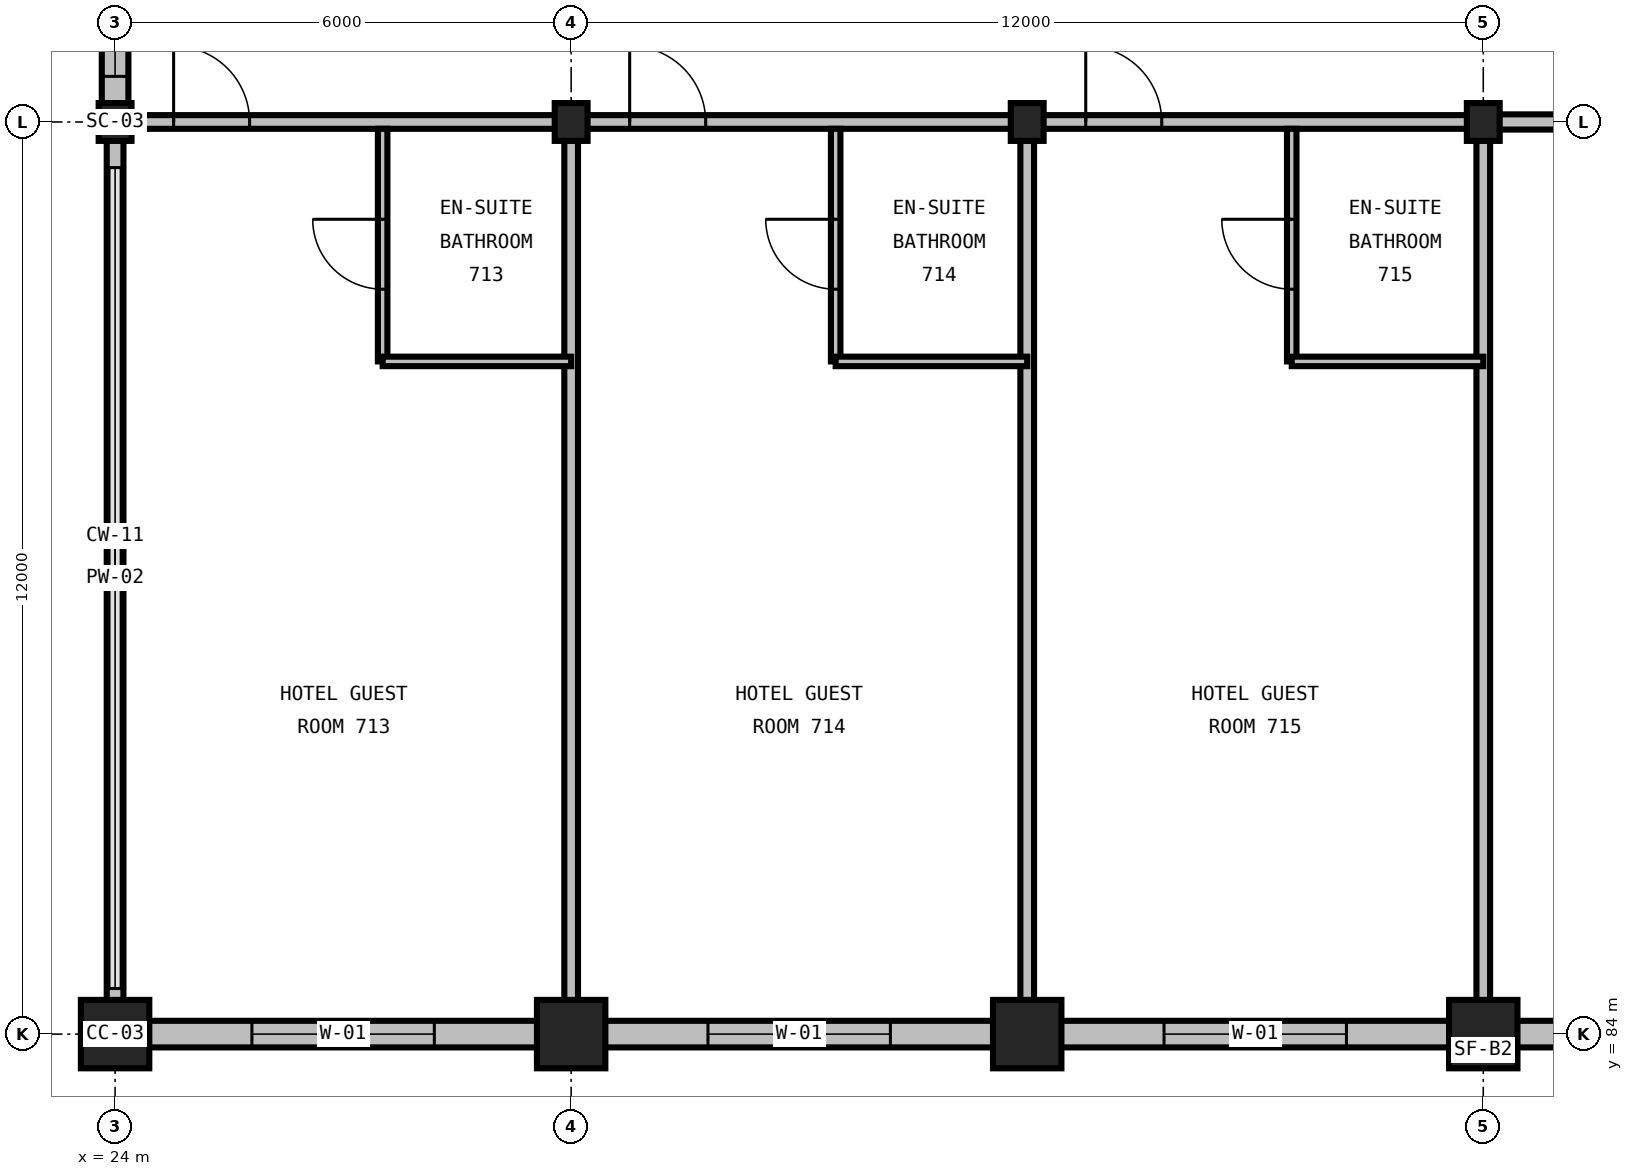
"""IFC4 building model, lengths in metres.
Left out: names, types, materials, properties, quantities, classifications, styles, units other than length and angle.
Written with IfcOpenShell. Run it as: python <this file> out.ifc"""

import sys

from ifc_helpers import new_model, si_unit, direction, frame, frame_2d, origin, origin_2d, place, context, subcontext, project, spatial, rectangle, i_section, extrude, element, fill, save


model = new_model("IFC4")
c1 = context("Model", 3, precision=1e-05, world=origin(), true_north=direction((0.0, 1.0)))
c2 = subcontext(c1, "Body", "Model", "MODEL_VIEW")
j1 = project(units=[si_unit("LENGTHUNIT", "METRE"), si_unit("PLANEANGLEUNIT", "RADIAN")], contexts=[c1])
p1 = place(None, origin())
s1 = spatial("IfcSite", under=j1, at=p1, CompositionType="ELEMENT")
p2 = place(p1, origin())
s2 = spatial("IfcBuilding", under=s1, at=p2, CompositionType="ELEMENT")
p3 = place(p2, frame((0.0, 0.0, 34.8)))
s3 = spatial("IfcBuildingStorey", under=s2, at=p3, CompositionType="ELEMENT", Elevation=34.8)
p4 = place(p3, frame((24.0, 84.0, 0.0), z_axis=(0.0, 0.0, 1.0), x_axis=(1.0, 0.0, 0.0)))
e1 = element("IfcColumn", 1, at=p4, inside=s3, PredefinedType="COLUMN", context=c2, shape_type="SweptSolid", body=[
    extrude(rectangle(XDim=0.9, YDim=0.9, at=origin_2d()), origin(), (0.0, 0.0, 1.0), 3.6),
])
p5 = place(p3, frame((24.0, 96.0, 0.0), z_axis=(0.0, 0.0, 1.0), x_axis=(1.0, 0.0, 0.0)))
e2 = element("IfcColumn", 2, at=p5, inside=s3, PredefinedType="COLUMN", context=c2, shape_type="SweptSolid", body=[
    extrude(i_section(OverallWidth=0.432, OverallDepth=0.498, WebThickness=0.056, FlangeThickness=0.089, FilletRadius=0.031, at=origin_2d()), origin(), (0.0, 0.0, 1.0), 3.6),
])
p6 = place(p3, frame((30.0, 84.0, 0.0), z_axis=(0.0, 0.0, 1.0), x_axis=(1.0, 0.0, 0.0)))
e3 = element("IfcColumn", 3, at=p6, inside=s3, PredefinedType="COLUMN", context=c2, shape_type="SweptSolid", body=[
    extrude(rectangle(XDim=0.9, YDim=0.9, at=origin_2d()), origin(), (0.0, 0.0, 1.0), 3.6),
])
p7 = place(p3, frame((30.0, 96.0, 0.0), z_axis=(0.0, 0.0, 1.0), x_axis=(1.0, 0.0, 0.0)))
e4 = element("IfcColumn", 4, at=p7, inside=s3, PredefinedType="COLUMN", context=c2, shape_type="SweptSolid", body=[
    extrude(i_section(OverallWidth=0.432, OverallDepth=0.498, WebThickness=0.056, FlangeThickness=0.089, FilletRadius=0.031, at=origin_2d()), origin(), (0.0, 0.0, 1.0), 3.6),
])
p8 = place(p3, frame((36.0, 84.0, 0.0), z_axis=(0.0, 0.0, 1.0), x_axis=(1.0, 0.0, 0.0)))
e5 = element("IfcColumn", 5, at=p8, inside=s3, PredefinedType="COLUMN", context=c2, shape_type="SweptSolid", body=[
    extrude(rectangle(XDim=0.9, YDim=0.9, at=origin_2d()), origin(), (0.0, 0.0, 1.0), 3.6),
])
p9 = place(p3, frame((36.0, 96.0, 0.0), z_axis=(0.0, 0.0, 1.0), x_axis=(1.0, 0.0, 0.0)))
e6 = element("IfcColumn", 6, at=p9, inside=s3, PredefinedType="COLUMN", context=c2, shape_type="SweptSolid", body=[
    extrude(i_section(OverallWidth=0.432, OverallDepth=0.498, WebThickness=0.056, FlangeThickness=0.089, FilletRadius=0.031, at=origin_2d()), origin(), (0.0, 0.0, 1.0), 3.6),
])
p10 = place(p3, frame((42.0, 84.0, 0.0), z_axis=(0.0, 0.0, 1.0), x_axis=(1.0, 0.0, 0.0)))
e7 = element("IfcColumn", 7, at=p10, inside=s3, PredefinedType="COLUMN", context=c2, shape_type="SweptSolid", body=[
    extrude(rectangle(XDim=0.9, YDim=0.9, at=origin_2d()), origin(), (0.0, 0.0, 1.0), 3.6),
])
p11 = place(p3, frame((42.0, 96.0, 0.0), z_axis=(0.0, 0.0, 1.0), x_axis=(1.0, 0.0, 0.0)))
e8 = element("IfcColumn", 8, at=p11, inside=s3, PredefinedType="COLUMN", context=c2, shape_type="SweptSolid", body=[
    extrude(i_section(OverallWidth=0.432, OverallDepth=0.498, WebThickness=0.056, FlangeThickness=0.089, FilletRadius=0.031, at=origin_2d()), origin(), (0.0, 0.0, 1.0), 3.6),
])
p12 = place(p3, frame((24.0, 84.0, 0.0), z_axis=(0.0, 0.0, 1.0), x_axis=(1.0, 0.0, 0.0)))
e9 = element("IfcWall", 9, at=p12, inside=s3, PredefinedType="STANDARD", context=c2, shape_type="SweptSolid", body=[
    extrude(rectangle(XDim=6.0, YDim=0.35, at=frame_2d((3.0, 0.0))), origin(), (0.0, 0.0, 1.0), 2.486),
])
p13 = place(p12, frame((1.8, 0.0, 0.75)))
e10 = element("IfcOpeningElement", 10, at=p13, cuts=e9, PredefinedType="OPENING", context=c2, shape_type="SweptSolid", body=[
    extrude(rectangle(XDim=2.4, YDim=1.65, at=frame_2d((1.2, 0.825))), frame((0.0, 0.19, 0.0), z_axis=(0.0, -1.0, 0.0), x_axis=(1.0, 0.0, 0.0)), (0.0, 0.0, 1.0), 0.38),
])
p14 = place(p3, frame((30.0, 84.0, 0.0), z_axis=(0.0, 0.0, 1.0), x_axis=(1.0, 0.0, 0.0)))
e11 = element("IfcWall", 11, at=p14, inside=s3, PredefinedType="STANDARD", context=c2, shape_type="SweptSolid", body=[
    extrude(rectangle(XDim=6.0, YDim=0.35, at=frame_2d((3.0, 0.0))), origin(), (0.0, 0.0, 1.0), 2.486),
])
p15 = place(p14, frame((1.8, 0.0, 0.75)))
e12 = element("IfcOpeningElement", 12, at=p15, cuts=e11, PredefinedType="OPENING", context=c2, shape_type="SweptSolid", body=[
    extrude(rectangle(XDim=2.4, YDim=1.65, at=frame_2d((1.2, 0.825))), frame((0.0, 0.19, 0.0), z_axis=(0.0, -1.0, 0.0), x_axis=(1.0, 0.0, 0.0)), (0.0, 0.0, 1.0), 0.38),
])
p16 = place(p3, frame((36.0, 84.0, 0.0), z_axis=(0.0, 0.0, 1.0), x_axis=(1.0, 0.0, 0.0)))
e13 = element("IfcWall", 13, at=p16, inside=s3, PredefinedType="STANDARD", context=c2, shape_type="SweptSolid", body=[
    extrude(rectangle(XDim=6.0, YDim=0.35, at=frame_2d((3.0, 0.0))), origin(), (0.0, 0.0, 1.0), 2.486),
])
p17 = place(p16, frame((1.8, 0.0, 0.75)))
e14 = element("IfcOpeningElement", 14, at=p17, cuts=e13, PredefinedType="OPENING", context=c2, shape_type="SweptSolid", body=[
    extrude(rectangle(XDim=2.4, YDim=1.65, at=frame_2d((1.2, 0.825))), frame((0.0, 0.19, 0.0), z_axis=(0.0, -1.0, 0.0), x_axis=(1.0, 0.0, 0.0)), (0.0, 0.0, 1.0), 0.38),
])
p18 = place(p3, frame((42.0, 84.0, 0.0), z_axis=(0.0, 0.0, 1.0), x_axis=(1.0, 0.0, 0.0)))
e15 = element("IfcWall", 15, at=p18, inside=s3, PredefinedType="STANDARD", context=c2, shape_type="SweptSolid", body=[
    extrude(rectangle(XDim=12.0, YDim=0.35, at=frame_2d((6.0, 0.0))), origin(), (0.0, 0.0, 1.0), 2.486),
])
p19 = place(p18, frame((1.8, 0.0, 0.75)))
e16 = element("IfcOpeningElement", 16, at=p19, cuts=e15, PredefinedType="OPENING", context=c2, shape_type="SweptSolid", body=[
    extrude(rectangle(XDim=2.4, YDim=1.65, at=frame_2d((1.2, 0.825))), frame((0.0, 0.19, 0.0), z_axis=(0.0, -1.0, 0.0), x_axis=(1.0, 0.0, 0.0)), (0.0, 0.0, 1.0), 0.38),
])
p20 = place(p18, frame((7.725, 0.0, 0.75)))
e17 = element("IfcOpeningElement", 17, at=p20, cuts=e15, PredefinedType="OPENING", context=c2, shape_type="SweptSolid", body=[
    extrude(rectangle(XDim=2.55, YDim=1.65, at=frame_2d((1.275, 0.825))), frame((0.0, 0.19, 0.0), z_axis=(0.0, -1.0, 0.0), x_axis=(1.0, 0.0, 0.0)), (0.0, 0.0, 1.0), 0.38),
])
p21 = place(p3, frame((24.0, 96.0, 0.0), z_axis=(0.0, 0.0, 1.0), x_axis=(0.0, -1.0, 0.0)))
e18 = element("IfcWall", 18, at=p21, inside=s3, PredefinedType="PARAPET", context=c2, shape_type="SweptSolid", body=[
    extrude(rectangle(XDim=12.0, YDim=0.22, at=frame_2d((6.0, 0.0))), origin(), (0.0, 0.0, 1.0), 0.2),
])
p22 = place(p3, frame((24.0, 105.0, 0.0), z_axis=(0.0, 0.0, 1.0), x_axis=(0.0, -1.0, 0.0)))
e19 = element("IfcWall", 19, at=p22, inside=s3, PredefinedType="STANDARD", context=c2, shape_type="SweptSolid", body=[
    extrude(rectangle(XDim=9.0, YDim=0.35, at=frame_2d((4.5, 0.0))), origin(), (0.0, 0.0, 1.0), 2.981),
])
p23 = place(p22, frame((6.6, 0.0, 0.85)))
e20 = element("IfcOpeningElement", 20, at=p23, cuts=e19, PredefinedType="OPENING", context=c2, shape_type="SweptSolid", body=[
    extrude(rectangle(XDim=1.8, YDim=1.5, at=frame_2d((0.9, 0.75))), frame((0.0, 0.19, 0.0), z_axis=(0.0, -1.0, 0.0), x_axis=(1.0, 0.0, 0.0)), (0.0, 0.0, 1.0), 0.38),
])
p24 = place(p3, frame((42.0, 96.0, 0.0), z_axis=(0.0, 0.0, 1.0), x_axis=(1.0, 0.0, 0.0)))
e21 = element("IfcWall", 21, at=p24, inside=s3, PredefinedType="PARTITIONING", context=c2, shape_type="SweptSolid", body=[
    extrude(rectangle(XDim=6.0, YDim=0.2, at=frame_2d((3.0, 0.0))), origin(), (0.0, 0.0, 1.0), 2.359),
])
p25 = place(p24, frame((2.4, 0.0, 0.0)))
e22 = element("IfcOpeningElement", 22, at=p25, cuts=e21, PredefinedType="OPENING", context=c2, shape_type="SweptSolid", body=[
    extrude(rectangle(XDim=1.8, YDim=2.3, at=frame_2d((0.9, 1.15))), frame((0.0, 0.115, 0.0), z_axis=(0.0, -1.0, 0.0), x_axis=(1.0, 0.0, 0.0)), (0.0, 0.0, 1.0), 0.23),
])
p26 = place(p3, frame((42.0, 84.175, 0.0), z_axis=(0.0, 0.0, 1.0), x_axis=(0.0, 1.0, 0.0)))
e23 = element("IfcWall", 23, at=p26, inside=s3, PredefinedType="PARTITIONING", context=c2, shape_type="SweptSolid", body=[
    extrude(rectangle(XDim=11.825, YDim=0.18, at=frame_2d((5.913, 0.0))), origin(), (0.0, 0.0, 1.0), 2.59),
])
p27 = place(p3, frame((24.085, 96.0, 0.0), z_axis=(0.0, 0.0, 1.0), x_axis=(1.0, 0.0, 0.0)))
e24 = element("IfcWall", 24, at=p27, inside=s3, PredefinedType="PARTITIONING", context=c2, shape_type="SweptSolid", body=[
    extrude(rectangle(XDim=5.915, YDim=0.18, at=frame_2d((2.957, 0.0))), origin(), (0.0, 0.0, 1.0), 2.736),
])
p28 = place(p27, frame((0.685, 0.0, 0.0)))
e25 = element("IfcOpeningElement", 25, at=p28, cuts=e24, PredefinedType="OPENING", context=c2, shape_type="SweptSolid", body=[
    extrude(rectangle(XDim=1.0, YDim=2.15, at=frame_2d((0.5, 1.075))), frame((0.0, 0.105, 0.0), z_axis=(0.0, -1.0, 0.0), x_axis=(1.0, 0.0, 0.0)), (0.0, 0.0, 1.0), 0.21),
])
p29 = place(p3, frame((30.0, 84.175, 0.0), z_axis=(0.0, 0.0, 1.0), x_axis=(0.0, 1.0, 0.0)))
e26 = element("IfcWall", 26, at=p29, inside=s3, PredefinedType="PARTITIONING", context=c2, shape_type="SweptSolid", body=[
    extrude(rectangle(XDim=11.825, YDim=0.18, at=frame_2d((5.913, 0.0))), origin(), (0.0, 0.0, 1.0), 2.59),
])
p30 = place(p3, frame((27.52, 92.85, 0.0), z_axis=(0.0, 0.0, 1.0), x_axis=(0.0, 1.0, 0.0)))
e27 = element("IfcWall", 27, at=p30, inside=s3, PredefinedType="PARTITIONING", context=c2, shape_type="SweptSolid", body=[
    extrude(rectangle(XDim=3.06, YDim=0.125, at=frame_2d((1.53, 0.0))), origin(), (0.0, 0.0, 1.0), 3.29),
])
p31 = place(p30, frame((0.95, 0.0, 0.0)))
e28 = element("IfcOpeningElement", 28, at=p31, cuts=e27, PredefinedType="OPENING", context=c2, shape_type="SweptSolid", body=[
    extrude(rectangle(XDim=0.92, YDim=2.1, at=frame_2d((0.46, 1.05))), frame((0.0, 0.077, 0.0), z_axis=(0.0, -1.0, 0.0), x_axis=(1.0, 0.0, 0.0)), (0.0, 0.0, 1.0), 0.155),
])
p32 = place(p3, frame((27.52, 92.85, 0.0), z_axis=(0.0, 0.0, 1.0), x_axis=(1.0, 0.0, 0.0)))
e29 = element("IfcWall", 29, at=p32, inside=s3, PredefinedType="PARTITIONING", context=c2, shape_type="SweptSolid", body=[
    extrude(rectangle(XDim=2.48, YDim=0.125, at=frame_2d((1.24, 0.0))), origin(), (0.0, 0.0, 1.0), 3.29),
])
p33 = place(p3, frame((30.0, 96.0, 0.0), z_axis=(0.0, 0.0, 1.0), x_axis=(1.0, 0.0, 0.0)))
e30 = element("IfcWall", 30, at=p33, inside=s3, PredefinedType="PARTITIONING", context=c2, shape_type="SweptSolid", body=[
    extrude(rectangle(XDim=6.0, YDim=0.18, at=frame_2d((3.0, 0.0))), origin(), (0.0, 0.0, 1.0), 2.736),
])
p34 = place(p33, frame((0.77, 0.0, 0.0)))
e31 = element("IfcOpeningElement", 31, at=p34, cuts=e30, PredefinedType="OPENING", context=c2, shape_type="SweptSolid", body=[
    extrude(rectangle(XDim=1.0, YDim=2.15, at=frame_2d((0.5, 1.075))), frame((0.0, 0.105, 0.0), z_axis=(0.0, -1.0, 0.0), x_axis=(1.0, 0.0, 0.0)), (0.0, 0.0, 1.0), 0.21),
])
p35 = place(p3, frame((36.0, 84.175, 0.0), z_axis=(0.0, 0.0, 1.0), x_axis=(0.0, 1.0, 0.0)))
e32 = element("IfcWall", 32, at=p35, inside=s3, PredefinedType="PARTITIONING", context=c2, shape_type="SweptSolid", body=[
    extrude(rectangle(XDim=11.825, YDim=0.18, at=frame_2d((5.913, 0.0))), origin(), (0.0, 0.0, 1.0), 2.59),
])
p36 = place(p3, frame((33.48, 92.85, 0.0), z_axis=(0.0, 0.0, 1.0), x_axis=(0.0, 1.0, 0.0)))
e33 = element("IfcWall", 33, at=p36, inside=s3, PredefinedType="PARTITIONING", context=c2, shape_type="SweptSolid", body=[
    extrude(rectangle(XDim=3.06, YDim=0.125, at=frame_2d((1.53, 0.0))), origin(), (0.0, 0.0, 1.0), 3.29),
])
p37 = place(p36, frame((0.95, 0.0, 0.0)))
e34 = element("IfcOpeningElement", 34, at=p37, cuts=e33, PredefinedType="OPENING", context=c2, shape_type="SweptSolid", body=[
    extrude(rectangle(XDim=0.92, YDim=2.1, at=frame_2d((0.46, 1.05))), frame((0.0, 0.077, 0.0), z_axis=(0.0, -1.0, 0.0), x_axis=(1.0, 0.0, 0.0)), (0.0, 0.0, 1.0), 0.155),
])
p38 = place(p3, frame((33.48, 92.85, 0.0), z_axis=(0.0, 0.0, 1.0), x_axis=(1.0, 0.0, 0.0)))
e35 = element("IfcWall", 35, at=p38, inside=s3, PredefinedType="PARTITIONING", context=c2, shape_type="SweptSolid", body=[
    extrude(rectangle(XDim=2.52, YDim=0.125, at=frame_2d((1.26, 0.0))), origin(), (0.0, 0.0, 1.0), 3.29),
])
p39 = place(p3, frame((36.0, 96.0, 0.0), z_axis=(0.0, 0.0, 1.0), x_axis=(1.0, 0.0, 0.0)))
e36 = element("IfcWall", 36, at=p39, inside=s3, PredefinedType="PARTITIONING", context=c2, shape_type="SweptSolid", body=[
    extrude(rectangle(XDim=6.0, YDim=0.18, at=frame_2d((3.0, 0.0))), origin(), (0.0, 0.0, 1.0), 2.736),
])
p40 = place(p39, frame((0.77, 0.0, 0.0)))
e37 = element("IfcOpeningElement", 37, at=p40, cuts=e36, PredefinedType="OPENING", context=c2, shape_type="SweptSolid", body=[
    extrude(rectangle(XDim=1.0, YDim=2.15, at=frame_2d((0.5, 1.075))), frame((0.0, 0.105, 0.0), z_axis=(0.0, -1.0, 0.0), x_axis=(1.0, 0.0, 0.0)), (0.0, 0.0, 1.0), 0.21),
])
p41 = place(p3, frame((39.48, 92.85, 0.0), z_axis=(0.0, 0.0, 1.0), x_axis=(0.0, 1.0, 0.0)))
e38 = element("IfcWall", 38, at=p41, inside=s3, PredefinedType="PARTITIONING", context=c2, shape_type="SweptSolid", body=[
    extrude(rectangle(XDim=3.06, YDim=0.125, at=frame_2d((1.53, 0.0))), origin(), (0.0, 0.0, 1.0), 3.29),
])
p42 = place(p41, frame((0.95, 0.0, 0.0)))
e39 = element("IfcOpeningElement", 39, at=p42, cuts=e38, PredefinedType="OPENING", context=c2, shape_type="SweptSolid", body=[
    extrude(rectangle(XDim=0.92, YDim=2.1, at=frame_2d((0.46, 1.05))), frame((0.0, 0.077, 0.0), z_axis=(0.0, -1.0, 0.0), x_axis=(1.0, 0.0, 0.0)), (0.0, 0.0, 1.0), 0.155),
])
p43 = place(p3, frame((39.48, 92.85, 0.0), z_axis=(0.0, 0.0, 1.0), x_axis=(1.0, 0.0, 0.0)))
e40 = element("IfcWall", 40, at=p43, inside=s3, PredefinedType="PARTITIONING", context=c2, shape_type="SweptSolid", body=[
    extrude(rectangle(XDim=2.52, YDim=0.125, at=frame_2d((1.26, 0.0))), origin(), (0.0, 0.0, 1.0), 3.29),
])
p44 = place(p13, origin())
e41 = element("IfcWindow", 41, at=p44, inside=s3, PartitioningType="DOUBLE_PANEL_VERTICAL", PredefinedType="WINDOW", context=c2, shape_type="SweptSolid", body=[
    extrude(rectangle(XDim=2.4, YDim=1.65, at=frame_2d((1.2, 0.825))), frame((0.0, 0.03, 0.0), z_axis=(0.0, -1.0, 0.0), x_axis=(1.0, 0.0, 0.0)), (0.0, 0.0, 1.0), 0.06),
])
fill(e10, e41)
p45 = place(p15, origin())
e42 = element("IfcWindow", 42, at=p45, inside=s3, PartitioningType="DOUBLE_PANEL_VERTICAL", PredefinedType="WINDOW", context=c2, shape_type="SweptSolid", body=[
    extrude(rectangle(XDim=2.4, YDim=1.65, at=frame_2d((1.2, 0.825))), frame((0.0, 0.03, 0.0), z_axis=(0.0, -1.0, 0.0), x_axis=(1.0, 0.0, 0.0)), (0.0, 0.0, 1.0), 0.06),
])
fill(e12, e42)
p46 = place(p17, origin())
e43 = element("IfcWindow", 43, at=p46, inside=s3, PartitioningType="DOUBLE_PANEL_VERTICAL", PredefinedType="WINDOW", context=c2, shape_type="SweptSolid", body=[
    extrude(rectangle(XDim=2.4, YDim=1.65, at=frame_2d((1.2, 0.825))), frame((0.0, 0.03, 0.0), z_axis=(0.0, -1.0, 0.0), x_axis=(1.0, 0.0, 0.0)), (0.0, 0.0, 1.0), 0.06),
])
fill(e14, e43)
p47 = place(p23, origin())
e44 = element("IfcWindow", 44, at=p47, inside=s3, PartitioningType="SINGLE_PANEL", PredefinedType="WINDOW", context=c2, shape_type="SweptSolid", body=[
    extrude(rectangle(XDim=1.8, YDim=1.5, at=frame_2d((0.9, 0.75))), frame((0.0, 0.03, 0.0), z_axis=(0.0, -1.0, 0.0), x_axis=(1.0, 0.0, 0.0)), (0.0, 0.0, 1.0), 0.06),
])
fill(e20, e44)
p48 = place(p28, origin())
e45 = element("IfcDoor", 45, at=p48, inside=s3, OperationType="SINGLE_SWING_LEFT", PredefinedType="DOOR", context=c2, shape_type="SweptSolid", body=[
    extrude(rectangle(XDim=1.0, YDim=2.15, at=frame_2d((0.5, 1.075))), frame((0.0, 0.025, 0.0), z_axis=(0.0, -1.0, 0.0), x_axis=(1.0, 0.0, 0.0)), (0.0, 0.0, 1.0), 0.05),
])
fill(e25, e45)
p49 = place(p31, origin())
e46 = element("IfcDoor", 46, at=p49, inside=s3, OperationType="SINGLE_SWING_RIGHT", PredefinedType="DOOR", context=c2, shape_type="SweptSolid", body=[
    extrude(rectangle(XDim=0.92, YDim=2.1, at=frame_2d((0.46, 1.05))), frame((0.0, 0.025, 0.0), z_axis=(0.0, -1.0, 0.0), x_axis=(1.0, 0.0, 0.0)), (0.0, 0.0, 1.0), 0.05),
])
fill(e28, e46)
p50 = place(p34, origin())
e47 = element("IfcDoor", 47, at=p50, inside=s3, OperationType="SINGLE_SWING_LEFT", PredefinedType="DOOR", context=c2, shape_type="SweptSolid", body=[
    extrude(rectangle(XDim=1.0, YDim=2.15, at=frame_2d((0.5, 1.075))), frame((0.0, 0.025, 0.0), z_axis=(0.0, -1.0, 0.0), x_axis=(1.0, 0.0, 0.0)), (0.0, 0.0, 1.0), 0.05),
])
fill(e31, e47)
p51 = place(p37, origin())
e48 = element("IfcDoor", 48, at=p51, inside=s3, OperationType="SINGLE_SWING_RIGHT", PredefinedType="DOOR", context=c2, shape_type="SweptSolid", body=[
    extrude(rectangle(XDim=0.92, YDim=2.1, at=frame_2d((0.46, 1.05))), frame((0.0, 0.025, 0.0), z_axis=(0.0, -1.0, 0.0), x_axis=(1.0, 0.0, 0.0)), (0.0, 0.0, 1.0), 0.05),
])
fill(e34, e48)
p52 = place(p40, origin())
e49 = element("IfcDoor", 49, at=p52, inside=s3, OperationType="SINGLE_SWING_LEFT", PredefinedType="DOOR", context=c2, shape_type="SweptSolid", body=[
    extrude(rectangle(XDim=1.0, YDim=2.15, at=frame_2d((0.5, 1.075))), frame((0.0, 0.025, 0.0), z_axis=(0.0, -1.0, 0.0), x_axis=(1.0, 0.0, 0.0)), (0.0, 0.0, 1.0), 0.05),
])
fill(e37, e49)
p53 = place(p42, origin())
e50 = element("IfcDoor", 50, at=p53, inside=s3, OperationType="SINGLE_SWING_RIGHT", PredefinedType="DOOR", context=c2, shape_type="SweptSolid", body=[
    extrude(rectangle(XDim=0.92, YDim=2.1, at=frame_2d((0.46, 1.05))), frame((0.0, 0.025, 0.0), z_axis=(0.0, -1.0, 0.0), x_axis=(1.0, 0.0, 0.0)), (0.0, 0.0, 1.0), 0.05),
])
fill(e39, e50)
save(model, sys.argv[1])
